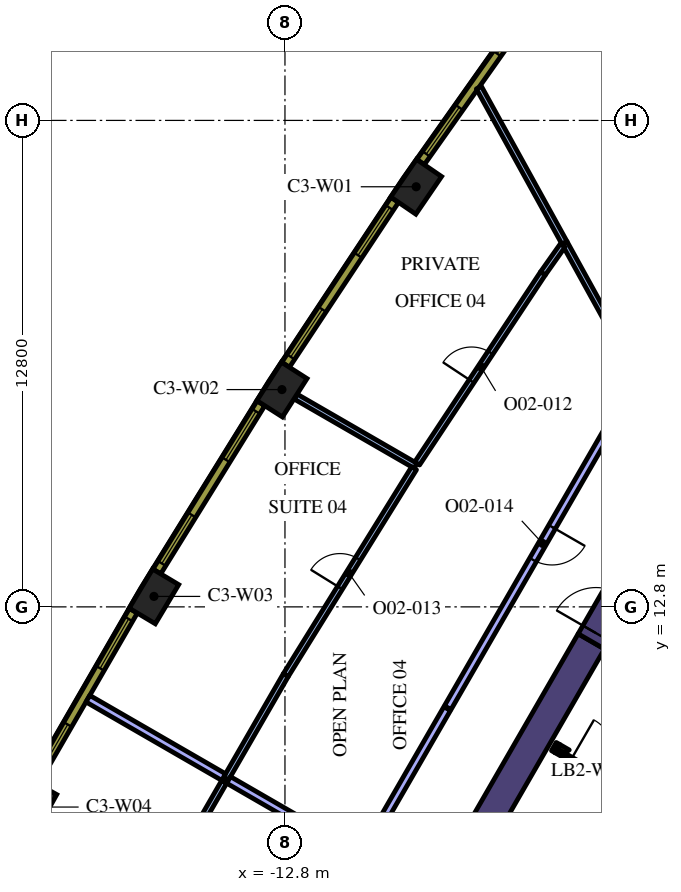
"""IFC4 building model, lengths in metres.
Left out: names, types, materials, properties, quantities, classifications, styles, units other than length and angle.
Written with IfcOpenShell. Run it as: python <this file> out.ifc"""

import sys

from ifc_helpers import new_model, si_unit, direction, frame, frame_2d, origin, origin_2d, place, context, subcontext, project, spatial, polyline, rectangle, outline, extrude, element, fill, save


model = new_model("IFC4")
c1 = context("Model", 3, precision=1e-05, world=origin(), true_north=direction((0.0, 1.0)))
c2 = subcontext(c1, "Body", "Model", "MODEL_VIEW")
j1 = project(units=[si_unit("LENGTHUNIT", "METRE"), si_unit("PLANEANGLEUNIT", "RADIAN")], contexts=[c1])
p1 = place(None, origin())
s1 = spatial("IfcSite", under=j1, at=p1, CompositionType="ELEMENT")
p2 = place(p1, origin())
s2 = spatial("IfcBuilding", under=s1, at=p2, CompositionType="ELEMENT")
p3 = place(p2, frame((0.0, 0.0, 154.2)))
s3 = spatial("IfcBuildingStorey", under=s2, at=p3, CompositionType="ELEMENT", Elevation=154.2)
for number, where, z_axis, x_axis in (
    (1, (-9.348, 23.854, 0.0), (0.0, 0.0, 1.0), (-0.565, -0.825, 0.0)),
    (2, (-12.88, 18.517, 0.0), (0.0, 0.0, 1.0), (-0.539, -0.842, 0.0)),
    (3, (-16.247, 13.075, 0.0), (0.0, 0.0, 1.0), (-0.513, -0.858, 0.0)),
    (4, (-19.447, 7.533, 0.0), (0.0, 0.0, 1.0), (-0.487, -0.874, 0.0)),
):
    element("IfcColumn", number, at=place(p3, frame(where, z_axis=z_axis, x_axis=x_axis)), inside=s3, PredefinedType="COLUMN", context=c2, shape_type="SweptSolid", body=[
        extrude(rectangle(XDim=1.2, YDim=0.8, at=origin_2d()), origin(), (0.0, 0.0, 1.0), 4.2),
    ])
p4 = place(p3, frame((-12.668, -1.842, 0.0), z_axis=(0.0, 0.0, 1.0), x_axis=(0.500003640647, 0.866023301845, 0.0)))
e5 = element("IfcWall", 5, at=p4, inside=s3, PredefinedType="SOLIDWALL", context=c2, shape_type="SweptSolid", body=[
    extrude(rectangle(XDim=15.858, YDim=0.8, at=frame_2d((7.929, 0.0))), origin(), (0.0, 0.0, 1.0), 4.2),
])
p5 = place(p3, frame((-8.06, -1.311, 0.0), z_axis=(0.0, 0.0, 1.0), x_axis=(0.50000273126, 0.866023826885, 0.0)))
e6 = element("IfcWall", 6, at=p5, inside=s3, PredefinedType="SOLIDWALL", context=c2, shape_type="SweptSolid", body=[
    extrude(rectangle(XDim=10.33, YDim=0.25, at=frame_2d((5.165, 0.0))), origin(), (0.0, 0.0, 1.0), 4.2),
])
p6 = place(p3, frame((-5.725, 9.125, 0.0), z_axis=(0.0, 0.0, 1.0), x_axis=(0.866185586049, -0.49972245349, 0.0)))
e7 = element("IfcWall", 7, at=p6, inside=s3, PredefinedType="SOLIDWALL", context=c2, shape_type="SweptSolid", body=[
    extrude(rectangle(XDim=0.11, YDim=0.25, at=frame_2d((0.055, 0.0))), origin(), (0.0, 0.0, 1.0), 4.2),
])
p7 = place(p3, origin())
e8 = element("IfcWall", 8, at=p7, inside=s3, PredefinedType="SOLIDWALL", context=c2, shape_type="SweptSolid", body=[
    extrude(outline(polyline([(-5.689, 8.96), (-5.69, 8.961), (-5.565, 9.177), (-5.319, 9.035), (-5.335, 9.026), (-5.351, 9.015), (-5.366, 9.002), (-5.379, 8.988), (-5.392, 8.972), (-5.402, 8.956), (-5.412, 8.939), (-5.629, 9.064), (-5.629, 9.064), (-5.689, 8.96)])), origin(), (0.0, 0.0, 1.0), 4.2),
])
p8 = place(p3, frame((-5.659, 9.012, 0.0), z_axis=(0.0, 0.0, 1.0), x_axis=(0.866009402589, -0.500027713859, 0.0)))
e9 = element("IfcWall", 9, at=p8, inside=s3, PredefinedType="PARTITIONING", context=c2, shape_type="SweptSolid", body=[
    extrude(rectangle(XDim=2.1, YDim=0.12, at=frame_2d((1.05, 0.0))), origin(), (0.0, 0.0, 1.0), 3.15),
])
p9 = place(p8, frame((0.45, 0.0, 0.0)))
e10 = element("IfcOpeningElement", 10, at=p9, cuts=e9, PredefinedType="OPENING", context=c2, shape_type="SweptSolid", body=[
    extrude(rectangle(XDim=1.2, YDim=2.1, at=frame_2d((0.6, 1.05))), frame((0.0, 0.07, 0.0), z_axis=(0.0, -1.0, 0.0), x_axis=(1.0, 0.0, 0.0)), (0.0, 0.0, 1.0), 0.14),
])
p10 = place(p3, frame((-4.739, 11.892, 0.0), z_axis=(0.0, 0.0, 1.0), x_axis=(0.500062241894, 0.865989465428, 0.0)))
e11 = element("IfcWall", 11, at=p10, inside=s3, PredefinedType="SOLIDWALL", context=c2, shape_type="SweptSolid", body=[
    extrude(rectangle(XDim=1.7, YDim=0.8, at=frame_2d((0.85, 0.0))), origin(), (0.0, 0.0, 1.0), 4.2),
])
p11 = place(p10, frame((0.25, 0.0, 0.0)))
e12 = element("IfcOpeningElement", 12, at=p11, cuts=e11, PredefinedType="OPENING", context=c2, shape_type="SweptSolid", body=[
    extrude(rectangle(XDim=1.2, YDim=2.1, at=frame_2d((0.6, 1.05))), frame((0.0, 0.41, 0.0), z_axis=(0.0, -1.0, 0.0), x_axis=(1.0, 0.0, 0.0)), (0.0, 0.0, 1.0), 0.82),
])
p12 = place(p3, frame((-5.442, 22.374, 0.0), z_axis=(0.0, 0.0, 1.0), x_axis=(-0.482987550425, 0.875627218703, 0.0)))
e13 = element("IfcWall", 13, at=p12, inside=s3, PredefinedType="PARTITIONING", context=c2, shape_type="SweptSolid", body=[
    extrude(rectangle(XDim=4.672, YDim=0.15, at=frame_2d((2.336, 0.0))), origin(), (0.0, 0.0, 1.0), 3.15),
])
p13 = place(p3, frame((-3.47, 18.8, 0.0), z_axis=(0.0, 0.0, 1.0), x_axis=(-0.482974768035, 0.875634269225, 0.0)))
e14 = element("IfcWall", 14, at=p13, inside=s3, PredefinedType="PARTITIONING", context=c2, shape_type="SweptSolid", body=[
    extrude(rectangle(XDim=4.09, YDim=0.15, at=frame_2d((2.045, 0.0))), origin(), (0.0, 0.0, 1.0), 3.15),
])
p14 = place(p3, frame((-9.363, 16.511, 0.0), z_axis=(0.0, 0.0, 1.0), x_axis=(-0.866006134298, 0.500033374244, 0.0)))
e15 = element("IfcWall", 15, at=p14, inside=s3, PredefinedType="PARTITIONING", context=c2, shape_type="SweptSolid", body=[
    extrude(rectangle(XDim=3.648, YDim=0.15, at=frame_2d((1.824, 0.0))), origin(), (0.0, 0.0, 1.0), 3.15),
])
p15 = place(p3, frame((-5.492, 22.31, 0.0), z_axis=(0.0, 0.0, 1.0), x_axis=(-0.576980663571, -0.816757806124, 0.0)))
e16 = element("IfcWall", 16, at=p15, inside=s3, PredefinedType="PARTITIONING", context=c2, shape_type="SweptSolid", body=[
    extrude(rectangle(XDim=0.902, YDim=0.15, at=frame_2d((0.451, 0.0))), origin(), (0.0, 0.0, 1.0), 3.15),
])
p16 = place(p3, frame((-9.322, 16.573, 0.0), z_axis=(0.0, 0.0, 1.0), x_axis=(0.551906048292, 0.833906298009, 0.0)))
e17 = element("IfcWall", 17, at=p16, inside=s3, PredefinedType="PARTITIONING", context=c2, shape_type="SweptSolid", body=[
    extrude(rectangle(XDim=5.995, YDim=0.15, at=frame_2d((2.998, 0.0))), origin(), (0.0, 0.0, 1.0), 3.15),
])
p17 = place(p16, frame((2.595, 0.0, 0.0)))
e18 = element("IfcOpeningElement", 18, at=p17, cuts=e17, PredefinedType="OPENING", context=c2, shape_type="SweptSolid", body=[
    extrude(rectangle(XDim=0.9, YDim=2.1, at=frame_2d((0.45, 1.05))), frame((0.0, 0.085, 0.0), z_axis=(0.0, -1.0, 0.0), x_axis=(1.0, 0.0, 0.0)), (0.0, 0.0, 1.0), 0.17),
])
p18 = place(p3, frame((-12.779, 11.002, 0.0), z_axis=(0.0, 0.0, 1.0), x_axis=(0.527026092571, 0.849849102929, 0.0)))
e19 = element("IfcWall", 19, at=p18, inside=s3, PredefinedType="PARTITIONING", context=c2, shape_type="SweptSolid", body=[
    extrude(rectangle(XDim=6.407, YDim=0.15, at=frame_2d((3.204, 0.0))), origin(), (0.0, 0.0, 1.0), 3.15),
])
p19 = place(p18, frame((2.707, 0.0, 0.0)))
e20 = element("IfcOpeningElement", 20, at=p19, cuts=e19, PredefinedType="OPENING", context=c2, shape_type="SweptSolid", body=[
    extrude(rectangle(XDim=0.9, YDim=2.1, at=frame_2d((0.45, 1.05))), frame((0.0, 0.085, 0.0), z_axis=(0.0, -1.0, 0.0), x_axis=(1.0, 0.0, 0.0)), (0.0, 0.0, 1.0), 0.17),
])
p20 = place(p3, frame((-12.779, 11.002, 0.0), z_axis=(0.0, 0.0, 1.0), x_axis=(-0.499996312652, -0.866027532665, 0.0)))
e21 = element("IfcWall", 21, at=p20, inside=s3, PredefinedType="PARTITIONING", context=c2, shape_type="SweptSolid", body=[
    extrude(rectangle(XDim=3.138, YDim=0.15, at=frame_2d((1.569, 0.0))), origin(), (0.0, 0.0, 1.0), 3.15),
])
p21 = place(p3, frame((-14.413, 8.322, 0.0), z_axis=(0.0, 0.0, 1.0), x_axis=(-0.866034795751, 0.499983732284, 0.0)))
e22 = element("IfcWall", 22, at=p21, inside=s3, PredefinedType="PARTITIONING", context=c2, shape_type="SweptSolid", body=[
    extrude(rectangle(XDim=4.125, YDim=0.2, at=frame_2d((2.062, 0.0))), origin(), (0.0, 0.0, 1.0), 3.15),
])
p22 = place(p3, frame((-10.782, 6.225, 0.0), z_axis=(0.0, 0.0, 1.0), x_axis=(-0.866034752867, 0.499983806564, 0.0)))
e23 = element("IfcWall", 23, at=p22, inside=s3, PredefinedType="PARTITIONING", context=c2, shape_type="SweptSolid", body=[
    extrude(rectangle(XDim=4.043, YDim=0.2, at=frame_2d((2.021, 0.0))), origin(), (0.0, 0.0, 1.0), 3.15),
])
p23 = place(p3, frame((-8.532, 10.122, 0.0), z_axis=(0.0, 0.0, 1.0), x_axis=(-0.499988222896, -0.866032203192, 0.0)))
e24 = element("IfcWall", 24, at=p23, inside=s3, PredefinedType="PARTITIONING", context=c2, shape_type="SweptSolid", body=[
    extrude(rectangle(XDim=4.4, YDim=0.2, at=frame_2d((2.2, 0.0))), origin(), (0.0, 0.0, 1.0), 3.15),
])
p24 = place(p3, frame((-3.522, 18.8, 0.0), z_axis=(0.0, 0.0, 1.0), x_axis=(-0.500015783377, -0.866016291056, 0.0)))
e25 = element("IfcWall", 25, at=p24, inside=s3, PredefinedType="PARTITIONING", context=c2, shape_type="SweptSolid", body=[
    extrude(rectangle(XDim=9.99, YDim=0.2, at=frame_2d((4.995, 0.0))), origin(), (0.0, 0.0, 1.0), 3.15),
])
p25 = place(p24, frame((4.5, 0.0, 0.0)))
e26 = element("IfcOpeningElement", 26, at=p25, cuts=e25, PredefinedType="OPENING", context=c2, shape_type="SweptSolid", body=[
    extrude(rectangle(XDim=1.0, YDim=2.1, at=frame_2d((0.5, 1.05))), frame((0.0, 0.11, 0.0), z_axis=(0.0, -1.0, 0.0), x_axis=(1.0, 0.0, 0.0)), (0.0, 0.0, 1.0), 0.22),
])
p26 = place(p3, frame((-14.398, 8.198, 0.0), z_axis=(0.0, 0.0, 1.0), x_axis=(-0.499993740961, -0.866029017412, 0.0)))
e27 = element("IfcWall", 27, at=p26, inside=s3, PredefinedType="PARTITIONING", context=c2, shape_type="SweptSolid", body=[
    extrude(rectangle(XDim=3.038, YDim=0.15, at=frame_2d((1.519, 0.0))), origin(), (0.0, 0.0, 1.0), 3.15),
])
p27 = place(p3, frame((-6.223, 28.762, 0.0), z_axis=(0.0, 0.0, 1.0), x_axis=(-0.577115207679, -0.816662743772, 0.0)))
e28 = element("IfcWall", 28, at=p27, inside=s3, PredefinedType="SOLIDWALL", context=c2, shape_type="SweptSolid", body=[
    extrude(rectangle(XDim=5.213, YDim=0.24, at=frame_2d((2.606, 0.0))), origin(), (0.0, 0.0, 1.0), 3.95),
])
p28 = place(p27, frame((0.221, 0.0, 0.9)))
e29 = element("IfcOpeningElement", 29, at=p28, cuts=e28, PredefinedType="OPENING", context=c2, shape_type="SweptSolid", body=[
    extrude(rectangle(XDim=1.5, YDim=2.55, at=frame_2d((0.75, 1.275))), frame((0.0, 0.13, 0.0), z_axis=(0.0, -1.0, 0.0), x_axis=(1.0, 0.0, 0.0)), (0.0, 0.0, 1.0), 0.26),
])
p29 = place(p27, frame((3.452, 0.0, 0.9)))
e30 = element("IfcOpeningElement", 30, at=p29, cuts=e28, PredefinedType="OPENING", context=c2, shape_type="SweptSolid", body=[
    extrude(rectangle(XDim=1.5, YDim=2.55, at=frame_2d((0.75, 1.275))), frame((0.0, 0.13, 0.0), z_axis=(0.0, -1.0, 0.0), x_axis=(1.0, 0.0, 0.0)), (0.0, 0.0, 1.0), 0.26),
])
p30 = place(p3, frame((-9.911, 23.51, 0.0), z_axis=(0.0, 0.0, 1.0), x_axis=(-0.551892811511, -0.833915058386, 0.0)))
e31 = element("IfcWall", 31, at=p30, inside=s3, PredefinedType="SOLIDWALL", context=c2, shape_type="SweptSolid", body=[
    extrude(rectangle(XDim=5.204, YDim=0.24, at=frame_2d((2.602, 0.0))), origin(), (0.0, 0.0, 1.0), 3.95),
])
p31 = place(p30, frame((0.248, 0.0, 0.9)))
e32 = element("IfcOpeningElement", 32, at=p31, cuts=e31, PredefinedType="OPENING", context=c2, shape_type="SweptSolid", body=[
    extrude(rectangle(XDim=1.5, YDim=2.55, at=frame_2d((0.75, 1.275))), frame((0.0, 0.13, 0.0), z_axis=(0.0, -1.0, 0.0), x_axis=(1.0, 0.0, 0.0)), (0.0, 0.0, 1.0), 0.26),
])
p32 = place(p30, frame((3.455, 0.0, 0.9)))
e33 = element("IfcOpeningElement", 33, at=p32, cuts=e31, PredefinedType="OPENING", context=c2, shape_type="SweptSolid", body=[
    extrude(rectangle(XDim=1.5, YDim=2.55, at=frame_2d((0.75, 1.275))), frame((0.0, 0.13, 0.0), z_axis=(0.0, -1.0, 0.0), x_axis=(1.0, 0.0, 0.0)), (0.0, 0.0, 1.0), 0.26),
])
p33 = place(p3, frame((-13.433, 18.156, 0.0), z_axis=(0.0, 0.0, 1.0), x_axis=(-0.526197926587, -0.850362124072, 0.0)))
e34 = element("IfcWall", 34, at=p33, inside=s3, PredefinedType="SOLIDWALL", context=c2, shape_type="SweptSolid", body=[
    extrude(rectangle(XDim=5.203, YDim=0.24, at=frame_2d((2.602, 0.0))), origin(), (0.0, 0.0, 1.0), 3.95),
])
p34 = place(p33, frame((0.248, 0.0, 0.9)))
e35 = element("IfcOpeningElement", 35, at=p34, cuts=e34, PredefinedType="OPENING", context=c2, shape_type="SweptSolid", body=[
    extrude(rectangle(XDim=1.5, YDim=2.55, at=frame_2d((0.75, 1.275))), frame((0.0, 0.13, 0.0), z_axis=(0.0, -1.0, 0.0), x_axis=(1.0, 0.0, 0.0)), (0.0, 0.0, 1.0), 0.26),
])
p35 = place(p33, frame((3.455, 0.0, 0.9)))
e36 = element("IfcOpeningElement", 36, at=p35, cuts=e34, PredefinedType="OPENING", context=c2, shape_type="SweptSolid", body=[
    extrude(rectangle(XDim=1.5, YDim=2.55, at=frame_2d((0.75, 1.275))), frame((0.0, 0.13, 0.0), z_axis=(0.0, -1.0, 0.0), x_axis=(1.0, 0.0, 0.0)), (0.0, 0.0, 1.0), 0.26),
])
p36 = place(p3, frame((-16.789, 12.697, 0.0), z_axis=(0.0, 0.0, 1.0), x_axis=(-0.500009456303, -0.866019944116, 0.0)))
e37 = element("IfcWall", 37, at=p36, inside=s3, PredefinedType="SOLIDWALL", context=c2, shape_type="SweptSolid", body=[
    extrude(rectangle(XDim=5.204, YDim=0.24, at=frame_2d((2.602, 0.0))), origin(), (0.0, 0.0, 1.0), 3.95),
])
p37 = place(p36, frame((0.248, 0.0, 0.9)))
e38 = element("IfcOpeningElement", 38, at=p37, cuts=e37, PredefinedType="OPENING", context=c2, shape_type="SweptSolid", body=[
    extrude(rectangle(XDim=1.5, YDim=2.55, at=frame_2d((0.75, 1.275))), frame((0.0, 0.13, 0.0), z_axis=(0.0, -1.0, 0.0), x_axis=(1.0, 0.0, 0.0)), (0.0, 0.0, 1.0), 0.26),
])
p38 = place(p36, frame((3.455, 0.0, 0.9)))
e39 = element("IfcOpeningElement", 39, at=p38, cuts=e37, PredefinedType="OPENING", context=c2, shape_type="SweptSolid", body=[
    extrude(rectangle(XDim=1.5, YDim=2.55, at=frame_2d((0.75, 1.275))), frame((0.0, 0.13, 0.0), z_axis=(0.0, -1.0, 0.0), x_axis=(1.0, 0.0, 0.0)), (0.0, 0.0, 1.0), 0.26),
])
p39 = place(p9, origin())
e40 = element("IfcDoor", 40, at=p39, inside=s3, OperationType="SINGLE_SWING_LEFT", PredefinedType="DOOR", context=c2, shape_type="SweptSolid", body=[
    extrude(rectangle(XDim=1.2, YDim=2.1, at=frame_2d((0.6, 1.05))), frame((0.0, 0.025, 0.0), z_axis=(0.0, -1.0, 0.0), x_axis=(1.0, 0.0, 0.0)), (0.0, 0.0, 1.0), 0.05),
])
fill(e10, e40)
p40 = place(p11, origin())
e41 = element("IfcDoor", 41, at=p40, inside=s3, OperationType="SINGLE_SWING_LEFT", PredefinedType="DOOR", context=c2, shape_type="SweptSolid", body=[
    extrude(rectangle(XDim=1.2, YDim=2.1, at=frame_2d((0.6, 1.05))), frame((0.0, 0.025, 0.0), z_axis=(0.0, -1.0, 0.0), x_axis=(1.0, 0.0, 0.0)), (0.0, 0.0, 1.0), 0.05),
])
fill(e12, e41)
p41 = place(p17, origin())
e42 = element("IfcDoor", 42, at=p41, inside=s3, OperationType="SINGLE_SWING_RIGHT", PredefinedType="DOOR", context=c2, shape_type="SweptSolid", body=[
    extrude(rectangle(XDim=0.9, YDim=2.1, at=frame_2d((0.45, 1.05))), frame((0.0, 0.025, 0.0), z_axis=(0.0, -1.0, 0.0), x_axis=(1.0, 0.0, 0.0)), (0.0, 0.0, 1.0), 0.05),
])
fill(e18, e42)
p42 = place(p19, origin())
e43 = element("IfcDoor", 43, at=p42, inside=s3, OperationType="SINGLE_SWING_LEFT", PredefinedType="DOOR", context=c2, shape_type="SweptSolid", body=[
    extrude(rectangle(XDim=0.9, YDim=2.1, at=frame_2d((0.45, 1.05))), frame((0.0, 0.025, 0.0), z_axis=(0.0, -1.0, 0.0), x_axis=(1.0, 0.0, 0.0)), (0.0, 0.0, 1.0), 0.05),
])
fill(e20, e43)
p43 = place(p25, origin())
e44 = element("IfcDoor", 44, at=p43, inside=s3, OperationType="SINGLE_SWING_RIGHT", PredefinedType="DOOR", context=c2, shape_type="SweptSolid", body=[
    extrude(rectangle(XDim=1.0, YDim=2.1, at=frame_2d((0.5, 1.05))), frame((0.0, 0.025, 0.0), z_axis=(0.0, -1.0, 0.0), x_axis=(1.0, 0.0, 0.0)), (0.0, 0.0, 1.0), 0.05),
])
fill(e26, e44)
p44 = place(p28, origin())
e45 = element("IfcWindow", 45, at=p44, inside=s3, PartitioningType="SINGLE_PANEL", PredefinedType="WINDOW", context=c2, shape_type="SweptSolid", body=[
    extrude(rectangle(XDim=1.5, YDim=2.55, at=frame_2d((0.75, 1.275))), frame((0.0, 0.04, 0.0), z_axis=(0.0, -1.0, 0.0), x_axis=(1.0, 0.0, 0.0)), (0.0, 0.0, 1.0), 0.06),
])
fill(e29, e45)
p45 = place(p29, origin())
e46 = element("IfcWindow", 46, at=p45, inside=s3, PartitioningType="SINGLE_PANEL", PredefinedType="WINDOW", context=c2, shape_type="SweptSolid", body=[
    extrude(rectangle(XDim=1.5, YDim=2.55, at=frame_2d((0.75, 1.275))), frame((0.0, 0.04, 0.0), z_axis=(0.0, -1.0, 0.0), x_axis=(1.0, 0.0, 0.0)), (0.0, 0.0, 1.0), 0.06),
])
fill(e30, e46)
p46 = place(p31, origin())
e47 = element("IfcWindow", 47, at=p46, inside=s3, PartitioningType="SINGLE_PANEL", PredefinedType="WINDOW", context=c2, shape_type="SweptSolid", body=[
    extrude(rectangle(XDim=1.5, YDim=2.55, at=frame_2d((0.75, 1.275))), frame((0.0, 0.04, 0.0), z_axis=(0.0, -1.0, 0.0), x_axis=(1.0, 0.0, 0.0)), (0.0, 0.0, 1.0), 0.06),
])
fill(e32, e47)
p47 = place(p32, origin())
e48 = element("IfcWindow", 48, at=p47, inside=s3, PartitioningType="SINGLE_PANEL", PredefinedType="WINDOW", context=c2, shape_type="SweptSolid", body=[
    extrude(rectangle(XDim=1.5, YDim=2.55, at=frame_2d((0.75, 1.275))), frame((0.0, 0.04, 0.0), z_axis=(0.0, -1.0, 0.0), x_axis=(1.0, 0.0, 0.0)), (0.0, 0.0, 1.0), 0.06),
])
fill(e33, e48)
p48 = place(p34, origin())
e49 = element("IfcWindow", 49, at=p48, inside=s3, PartitioningType="SINGLE_PANEL", PredefinedType="WINDOW", context=c2, shape_type="SweptSolid", body=[
    extrude(rectangle(XDim=1.5, YDim=2.55, at=frame_2d((0.75, 1.275))), frame((0.0, 0.04, 0.0), z_axis=(0.0, -1.0, 0.0), x_axis=(1.0, 0.0, 0.0)), (0.0, 0.0, 1.0), 0.06),
])
fill(e35, e49)
p49 = place(p35, origin())
e50 = element("IfcWindow", 50, at=p49, inside=s3, PartitioningType="SINGLE_PANEL", PredefinedType="WINDOW", context=c2, shape_type="SweptSolid", body=[
    extrude(rectangle(XDim=1.5, YDim=2.55, at=frame_2d((0.75, 1.275))), frame((0.0, 0.04, 0.0), z_axis=(0.0, -1.0, 0.0), x_axis=(1.0, 0.0, 0.0)), (0.0, 0.0, 1.0), 0.06),
])
fill(e36, e50)
p50 = place(p37, origin())
e51 = element("IfcWindow", 51, at=p50, inside=s3, PartitioningType="SINGLE_PANEL", PredefinedType="WINDOW", context=c2, shape_type="SweptSolid", body=[
    extrude(rectangle(XDim=1.5, YDim=2.55, at=frame_2d((0.75, 1.275))), frame((0.0, 0.04, 0.0), z_axis=(0.0, -1.0, 0.0), x_axis=(1.0, 0.0, 0.0)), (0.0, 0.0, 1.0), 0.06),
])
fill(e38, e51)
p51 = place(p38, origin())
e52 = element("IfcWindow", 52, at=p51, inside=s3, PartitioningType="SINGLE_PANEL", PredefinedType="WINDOW", context=c2, shape_type="SweptSolid", body=[
    extrude(rectangle(XDim=1.5, YDim=2.55, at=frame_2d((0.75, 1.275))), frame((0.0, 0.04, 0.0), z_axis=(0.0, -1.0, 0.0), x_axis=(1.0, 0.0, 0.0)), (0.0, 0.0, 1.0), 0.06),
])
fill(e39, e52)
save(model, sys.argv[1])
